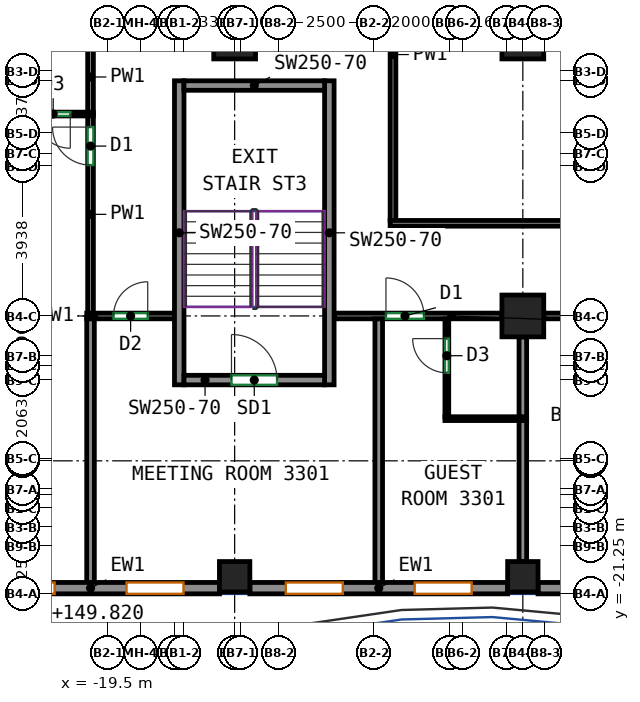
"""IFC4 building model, lengths in metres.
Left out: names, types, materials, properties, quantities, classifications, styles, units other than length and angle.
Written with IfcOpenShell. Run it as: python <this file> out.ifc"""

import sys

from ifc_helpers import new_model, si_unit, direction, frame, frame_2d, origin, origin_2d, place, context, subcontext, project, spatial, rectangle, extrude, source, transform, mapped, element, fill, save


model = new_model("IFC4")
c1 = context("Model", 3, precision=1e-05, world=origin(), true_north=direction((0.0, 1.0)))
c2 = subcontext(c1, "Body", "Model", "MODEL_VIEW")
j1 = project(units=[si_unit("LENGTHUNIT", "METRE"), si_unit("PLANEANGLEUNIT", "RADIAN")], contexts=[c1])
p1 = place(None, origin())
s1 = spatial("IfcSite", under=j1, at=p1, CompositionType="ELEMENT")
p2 = place(p1, origin())
s2 = spatial("IfcBuilding", under=s1, at=p2, CompositionType="ELEMENT")
p3 = place(p2, frame((0.0, 0.0, 147.3)))
s3 = spatial("IfcBuildingStorey", under=s2, at=p3, CompositionType="ELEMENT", Elevation=147.3)
m1 = source(origin(), c2, "Body", "SweptSolid", [
    extrude(rectangle(XDim=0.8, YDim=0.8, at=origin_2d()), origin(), (0.0, 0.0, 1.0), 3.12),
])
p4 = place(p3, frame((-16.167, -20.8, 0.0), z_axis=(0.0, 0.0, 1.0), x_axis=(1.0, 0.0, 0.0)))
e1 = element("IfcColumn", 1, at=p4, inside=s3, PredefinedType="COLUMN", context=c2, shape_type="MappedRepresentation", body=[
    mapped(m1, transform((0.0, 0.0, 0.0))),
])
m2 = source(origin(), c2, "Body", "SweptSolid", [
    extrude(rectangle(XDim=1.1, YDim=1.1, at=origin_2d()), origin(), (0.0, 0.0, 1.0), 3.12),
])
p5 = place(p3, frame((-16.167, -6.625, 0.0), z_axis=(0.0, 0.0, 1.0), x_axis=(1.0, 0.0, 0.0)))
e2 = element("IfcColumn", 2, at=p5, inside=s3, PredefinedType="COLUMN", context=c2, shape_type="MappedRepresentation", body=[
    mapped(m2, transform((0.0, 0.0, 0.0))),
])
p6 = place(p3, frame((-8.583, -20.8, 0.0), z_axis=(0.0, 0.0, 1.0), x_axis=(1.0, 0.0, 0.0)))
e3 = element("IfcColumn", 3, at=p6, inside=s3, PredefinedType="COLUMN", context=c2, shape_type="MappedRepresentation", body=[
    mapped(m1, transform((0.0, 0.0, 0.0))),
])
for number, where, z_axis, x_axis in (
    (4, (-8.583, -13.938, 0.0), (0.0, 0.0, 1.0), (1.0, 0.0, 0.0)),
    (5, (-8.583, -6.625, 0.0), (0.0, 0.0, 1.0), (1.0, 0.0, 0.0)),
):
    element("IfcColumn", number, at=place(p3, frame(where, z_axis=z_axis, x_axis=x_axis)), inside=s3, PredefinedType="COLUMN", context=c2, shape_type="MappedRepresentation", body=[
        mapped(m2, transform((0.0, 0.0, 0.0))),
    ])
m3 = source(origin(), c2, "Body", "SweptSolid", [
    extrude(rectangle(XDim=8.0, YDim=0.25, at=frame_2d((4.0, 0.0))), origin(), (0.0, 0.0, 1.0), 3.12),
])
for number, where, z_axis, x_axis in (
    (6, (-17.625, -15.75, 0.0), (0.0, 0.0, 1.0), (0.0, 1.0, 0.0)),
    (7, (-13.675, -15.75, 0.0), (0.0, 0.0, 1.0), (0.0, 1.0, 0.0)),
):
    element("IfcWall", number, at=place(p3, frame(where, z_axis=z_axis, x_axis=x_axis)), inside=s3, PredefinedType="SHEAR", context=c2, shape_type="MappedRepresentation", body=[
        mapped(m3, transform((0.0, 0.0, 0.0))),
    ])
m4 = source(origin(), c2, "Body", "SweptSolid", [
    extrude(rectangle(XDim=3.7, YDim=0.25, at=frame_2d((1.85, 0.0))), origin(), (0.0, 0.0, 1.0), 3.12),
])
p7 = place(p3, frame((-17.5, -15.625, 0.0), z_axis=(0.0, 0.0, 1.0), x_axis=(1.0, 0.0, 0.0)))
e8 = element("IfcWall", 8, at=p7, inside=s3, PredefinedType="SHEAR", context=c2, shape_type="MappedRepresentation", body=[
    mapped(m4, transform((0.0, 0.0, 0.0))),
])
p8 = place(p7, frame((1.25, 0.0, 0.0)))
e9 = element("IfcOpeningElement", 9, at=p8, cuts=e8, PredefinedType="OPENING", context=c2, shape_type="SweptSolid", body=[
    extrude(rectangle(XDim=1.2, YDim=2.1, at=frame_2d((0.6, 1.05))), frame((0.0, 0.135, 0.0), z_axis=(0.0, -1.0, 0.0), x_axis=(1.0, 0.0, 0.0)), (0.0, 0.0, 1.0), 0.27),
])
p9 = place(p3, frame((-17.5, -7.875, 0.0), z_axis=(0.0, 0.0, 1.0), x_axis=(1.0, 0.0, 0.0)))
e10 = element("IfcWall", 10, at=p9, inside=s3, PredefinedType="SHEAR", context=c2, shape_type="MappedRepresentation", body=[
    mapped(m4, transform((0.0, 0.0, 0.0))),
])
m5 = source(origin(), c2, "Body", "SweptSolid", [
    extrude(rectangle(XDim=6.783, YDim=0.3, at=frame_2d((3.392, 0.0))), origin(), (0.0, 0.0, 1.0), 3.12),
])
p10 = place(p3, frame((-23.35, -21.1, 0.0), z_axis=(0.0, 0.0, 1.0), x_axis=(1.0, 0.0, 0.0)))
e11 = element("IfcWall", 11, at=p10, inside=s3, PredefinedType="SOLIDWALL", context=c2, shape_type="MappedRepresentation", body=[
    mapped(m5, transform((0.0, 0.0, 0.0))),
])
p11 = place(p10, frame((0.946, 0.0, 0.85)))
e12 = element("IfcOpeningElement", 12, at=p11, cuts=e11, PredefinedType="OPENING", context=c2, shape_type="SweptSolid", body=[
    extrude(rectangle(XDim=1.5, YDim=1.95, at=frame_2d((0.75, 0.975))), frame((0.0, 0.16, 0.0), z_axis=(0.0, -1.0, 0.0), x_axis=(1.0, 0.0, 0.0)), (0.0, 0.0, 1.0), 0.32),
])
p12 = place(p10, frame((4.337, 0.0, 0.85)))
e13 = element("IfcOpeningElement", 13, at=p12, cuts=e11, PredefinedType="OPENING", context=c2, shape_type="SweptSolid", body=[
    extrude(rectangle(XDim=1.5, YDim=1.95, at=frame_2d((0.75, 0.975))), frame((0.0, 0.16, 0.0), z_axis=(0.0, -1.0, 0.0), x_axis=(1.0, 0.0, 0.0)), (0.0, 0.0, 1.0), 0.32),
])
m6 = source(origin(), c2, "Body", "SweptSolid", [
    extrude(rectangle(XDim=6.783, YDim=0.3, at=frame_2d((3.392, 0.0))), origin(), (0.0, 0.0, 1.0), 3.12),
])
p13 = place(p3, frame((-15.767, -21.1, 0.0), z_axis=(0.0, 0.0, 1.0), x_axis=(1.0, 0.0, 0.0)))
e14 = element("IfcWall", 14, at=p13, inside=s3, PredefinedType="SOLIDWALL", context=c2, shape_type="MappedRepresentation", body=[
    mapped(m6, transform((0.0, 0.0, 0.0))),
])
p14 = place(p13, frame((0.946, 0.0, 0.85)))
e15 = element("IfcOpeningElement", 15, at=p14, cuts=e14, PredefinedType="OPENING", context=c2, shape_type="SweptSolid", body=[
    extrude(rectangle(XDim=1.5, YDim=1.95, at=frame_2d((0.75, 0.975))), frame((0.0, 0.16, 0.0), z_axis=(0.0, -1.0, 0.0), x_axis=(1.0, 0.0, 0.0)), (0.0, 0.0, 1.0), 0.32),
])
p15 = place(p13, frame((4.338, 0.0, 0.85)))
e16 = element("IfcOpeningElement", 16, at=p15, cuts=e14, PredefinedType="OPENING", context=c2, shape_type="SweptSolid", body=[
    extrude(rectangle(XDim=1.5, YDim=1.95, at=frame_2d((0.75, 0.975))), frame((0.0, 0.16, 0.0), z_axis=(0.0, -1.0, 0.0), x_axis=(1.0, 0.0, 0.0)), (0.0, 0.0, 1.0), 0.32),
])
p16 = place(p3, frame((-8.183, -21.1, 0.0), z_axis=(0.0, 0.0, 1.0), x_axis=(1.0, 0.0, 0.0)))
e17 = element("IfcWall", 17, at=p16, inside=s3, PredefinedType="SOLIDWALL", context=c2, shape_type="MappedRepresentation", body=[
    mapped(m5, transform((0.0, 0.0, 0.0))),
])
p17 = place(p16, frame((0.946, 0.0, 0.85)))
e18 = element("IfcOpeningElement", 18, at=p17, cuts=e17, PredefinedType="OPENING", context=c2, shape_type="SweptSolid", body=[
    extrude(rectangle(XDim=1.5, YDim=1.95, at=frame_2d((0.75, 0.975))), frame((0.0, 0.16, 0.0), z_axis=(0.0, -1.0, 0.0), x_axis=(1.0, 0.0, 0.0)), (0.0, 0.0, 1.0), 0.32),
])
p18 = place(p16, frame((4.337, 0.0, 0.85)))
e19 = element("IfcOpeningElement", 19, at=p18, cuts=e17, PredefinedType="OPENING", context=c2, shape_type="SweptSolid", body=[
    extrude(rectangle(XDim=1.5, YDim=1.95, at=frame_2d((0.75, 0.975))), frame((0.0, 0.16, 0.0), z_axis=(0.0, -1.0, 0.0), x_axis=(1.0, 0.0, 0.0)), (0.0, 0.0, 1.0), 0.32),
])
p19 = place(p3, frame((-13.55, -13.938, 0.0), z_axis=(0.0, 0.0, 1.0), x_axis=(1.0, 0.0, 0.0)))
e20 = element("IfcWall", 20, at=p19, inside=s3, PredefinedType="PARTITIONING", context=c2, shape_type="SweptSolid", body=[
    extrude(rectangle(XDim=4.417, YDim=0.15, at=frame_2d((2.208, 0.0))), origin(), (0.0, 0.0, 1.0), 3.12),
])
p20 = place(p19, frame((1.365, 0.0, 0.0)))
e21 = element("IfcOpeningElement", 21, at=p20, cuts=e20, PredefinedType="OPENING", context=c2, shape_type="SweptSolid", body=[
    extrude(rectangle(XDim=1.0, YDim=2.1, at=frame_2d((0.5, 1.05))), frame((0.0, 0.085, 0.0), z_axis=(0.0, -1.0, 0.0), x_axis=(1.0, 0.0, 0.0)), (0.0, 0.0, 1.0), 0.17),
])
p21 = place(p3, frame((-20.059, -13.938, 0.0), z_axis=(0.0, 0.0, 1.0), x_axis=(1.0, 0.0, 0.0)))
e22 = element("IfcWall", 22, at=p21, inside=s3, PredefinedType="PARTITIONING", context=c2, shape_type="SweptSolid", body=[
    extrude(rectangle(XDim=2.309, YDim=0.15, at=frame_2d((1.155, 0.0))), origin(), (0.0, 0.0, 1.0), 3.12),
])
p22 = place(p21, frame((0.705, 0.0, 0.0)))
e23 = element("IfcOpeningElement", 23, at=p22, cuts=e22, PredefinedType="OPENING", context=c2, shape_type="SweptSolid", body=[
    extrude(rectangle(XDim=0.9, YDim=2.1, at=frame_2d((0.45, 1.05))), frame((0.0, 0.085, 0.0), z_axis=(0.0, -1.0, 0.0), x_axis=(1.0, 0.0, 0.0)), (0.0, 0.0, 1.0), 0.17),
])
p23 = place(p3, frame((-8.033, -13.938, 0.0), z_axis=(0.0, 0.0, 1.0), x_axis=(1.0, 0.0, 0.0)))
e24 = element("IfcWall", 24, at=p23, inside=s3, PredefinedType="PARTITIONING", context=c2, shape_type="SweptSolid", body=[
    extrude(rectangle(XDim=6.483, YDim=0.15, at=frame_2d((3.241, 0.0))), origin(), (0.0, 0.0, 1.0), 3.12),
])
p24 = place(p23, frame((0.508, 0.0, 0.0)))
e25 = element("IfcOpeningElement", 25, at=p24, cuts=e24, PredefinedType="OPENING", context=c2, shape_type="SweptSolid", body=[
    extrude(rectangle(XDim=0.9, YDim=2.1, at=frame_2d((0.45, 1.05))), frame((0.0, 0.085, 0.0), z_axis=(0.0, -1.0, 0.0), x_axis=(1.0, 0.0, 0.0)), (0.0, 0.0, 1.0), 0.17),
])
p25 = place(p23, frame((4.972, 0.0, 0.0)))
e26 = element("IfcOpeningElement", 26, at=p25, cuts=e24, PredefinedType="OPENING", context=c2, shape_type="SweptSolid", body=[
    extrude(rectangle(XDim=0.9, YDim=2.1, at=frame_2d((0.45, 1.05))), frame((0.0, 0.085, 0.0), z_axis=(0.0, -1.0, 0.0), x_axis=(1.0, 0.0, 0.0)), (0.0, 0.0, 1.0), 0.17),
])
p26 = place(p3, frame((-19.959, -13.863, 0.0), z_axis=(0.0, 0.0, 1.0), x_axis=(0.0, 1.0, 0.0)))
e27 = element("IfcWall", 27, at=p26, inside=s3, PredefinedType="PARTITIONING", context=c2, shape_type="SweptSolid", body=[
    extrude(rectangle(XDim=5.198, YDim=0.15, at=frame_2d((2.599, 0.0))), origin(), (0.0, 0.0, 1.0), 3.12),
])
p27 = place(p26, frame((3.895, 0.0, 0.0)))
e28 = element("IfcOpeningElement", 28, at=p27, cuts=e27, PredefinedType="OPENING", context=c2, shape_type="SweptSolid", body=[
    extrude(rectangle(XDim=1.0, YDim=2.1, at=frame_2d((0.5, 1.05))), frame((0.0, 0.085, 0.0), z_axis=(0.0, -1.0, 0.0), x_axis=(1.0, 0.0, 0.0)), (0.0, 0.0, 1.0), 0.17),
])
p28 = place(p3, frame((-19.959, -8.585, 0.0), z_axis=(0.0, 0.0, 1.0), x_axis=(0.0, 1.0, 0.0)))
e29 = element("IfcWall", 29, at=p28, inside=s3, PredefinedType="PARTITIONING", context=c2, shape_type="SweptSolid", body=[
    extrude(rectangle(XDim=1.87, YDim=0.15, at=frame_2d((0.935, 0.0))), origin(), (0.0, 0.0, 1.0), 3.12),
])
p29 = place(p3, frame((-12.0, -11.425, 0.0), z_axis=(0.0, 0.0, 1.0), x_axis=(0.0, 1.0, 0.0)))
e30 = element("IfcWall", 30, at=p29, inside=s3, PredefinedType="PARTITIONING", context=c2, shape_type="SweptSolid", body=[
    extrude(rectangle(XDim=14.55, YDim=0.15, at=frame_2d((7.275, 0.0))), origin(), (0.0, 0.0, 1.0), 3.12),
])
p30 = place(p29, frame((7.327, 0.0, 0.0)))
e31 = element("IfcOpeningElement", 31, at=p30, cuts=e30, PredefinedType="OPENING", context=c2, shape_type="SweptSolid", body=[
    extrude(rectangle(XDim=0.9, YDim=2.1, at=frame_2d((0.45, 1.05))), frame((0.0, 0.085, 0.0), z_axis=(0.0, -1.0, 0.0), x_axis=(1.0, 0.0, 0.0)), (0.0, 0.0, 1.0), 0.17),
])
p31 = place(p3, frame((-12.075, -11.5, 0.0), z_axis=(0.0, 0.0, 1.0), x_axis=(1.0, 0.0, 0.0)))
e32 = element("IfcWall", 32, at=p31, inside=s3, PredefinedType="PARTITIONING", context=c2, shape_type="SweptSolid", body=[
    extrude(rectangle(XDim=28.35, YDim=0.15, at=frame_2d((14.175, 0.0))), origin(), (0.0, 0.0, 1.0), 3.12),
])
p32 = place(p31, frame((13.677, 0.0, 0.0)))
e33 = element("IfcOpeningElement", 33, at=p32, cuts=e32, PredefinedType="OPENING", context=c2, shape_type="SweptSolid", body=[
    extrude(rectangle(XDim=0.9, YDim=2.1, at=frame_2d((0.45, 1.05))), frame((0.0, 0.085, 0.0), z_axis=(0.0, -1.0, 0.0), x_axis=(1.0, 0.0, 0.0)), (0.0, 0.0, 1.0), 0.17),
])
for number, where, z_axis, x_axis in (
    (34, (-12.375, -21.0, 0.0), (0.0, 0.0, 1.0), (0.0, 1.0, 0.0)),
    (35, (-19.959, -21.0, 0.0), (0.0, 0.0, 1.0), (0.0, 1.0, 0.0)),
):
    element("IfcWall", number, at=place(p3, frame(where, z_axis=z_axis, x_axis=x_axis)), inside=s3, PredefinedType="PARTITIONING", context=c2, shape_type="SweptSolid", body=[
        extrude(rectangle(XDim=6.985, YDim=0.2, at=frame_2d((3.493, 0.0))), origin(), (0.0, 0.0, 1.0), 3.12),
    ])
p33 = place(p3, frame((-10.583, -16.59, 0.0), z_axis=(0.0, 0.0, 1.0), x_axis=(0.0, 1.0, 0.0)))
e36 = element("IfcWall", 36, at=p33, inside=s3, PredefinedType="PARTITIONING", context=c2, shape_type="SweptSolid", body=[
    extrude(rectangle(XDim=2.575, YDim=0.1, at=frame_2d((1.288, 0.0))), origin(), (0.0, 0.0, 1.0), 3.12),
])
p34 = place(p33, frame((1.156, 0.0, 0.0)))
e37 = element("IfcOpeningElement", 37, at=p34, cuts=e36, PredefinedType="OPENING", context=c2, shape_type="SweptSolid", body=[
    extrude(rectangle(XDim=0.9, YDim=2.1, at=frame_2d((0.45, 1.05))), frame((0.0, 0.06, 0.0), z_axis=(0.0, -1.0, 0.0), x_axis=(1.0, 0.0, 0.0)), (0.0, 0.0, 1.0), 0.12),
])
p35 = place(p3, frame((-10.633, -16.64, 0.0), z_axis=(0.0, 0.0, 1.0), x_axis=(1.0, 0.0, 0.0)))
e38 = element("IfcWall", 38, at=p35, inside=s3, PredefinedType="PARTITIONING", context=c2, shape_type="SweptSolid", body=[
    extrude(rectangle(XDim=2.15, YDim=0.1, at=frame_2d((1.075, 0.0))), origin(), (0.0, 0.0, 1.0), 3.12),
])
p36 = place(p3, frame((-8.583, -20.4, 0.0), z_axis=(0.0, 0.0, 1.0), x_axis=(0.0, 1.0, 0.0)))
e39 = element("IfcWall", 39, at=p36, inside=s3, PredefinedType="PARTITIONING", context=c2, shape_type="SweptSolid", body=[
    extrude(rectangle(XDim=3.71, YDim=0.2, at=frame_2d((1.855, 0.0))), origin(), (0.0, 0.0, 1.0), 3.12),
])
p37 = place(p3, frame((-8.583, -16.59, 0.0), z_axis=(0.0, 0.0, 1.0), x_axis=(0.0, 1.0, 0.0)))
e40 = element("IfcWall", 40, at=p37, inside=s3, PredefinedType="PARTITIONING", context=c2, shape_type="SweptSolid", body=[
    extrude(rectangle(XDim=2.102, YDim=0.2, at=frame_2d((1.051, 0.0))), origin(), (0.0, 0.0, 1.0), 3.12),
])
p38 = place(p3, frame((-19.886, -8.625, 0.0), z_axis=(0.0, 0.0, 1.0), x_axis=(-1.0, 0.0, 0.0)))
e41 = element("IfcWall", 41, at=p38, inside=s3, PredefinedType="PARTITIONING", context=c2, shape_type="SweptSolid", body=[
    extrude(rectangle(XDim=2.823, YDim=0.1, at=frame_2d((1.412, 0.0))), origin(), (0.0, 0.0, 1.0), 3.12),
])
p39 = place(p38, frame((0.606, 0.0, 0.0)))
e42 = element("IfcOpeningElement", 42, at=p39, cuts=e41, PredefinedType="OPENING", context=c2, shape_type="SweptSolid", body=[
    extrude(rectangle(XDim=0.9, YDim=2.1, at=frame_2d((0.45, 1.05))), frame((0.0, 0.06, 0.0), z_axis=(0.0, -1.0, 0.0), x_axis=(1.0, 0.0, 0.0)), (0.0, 0.0, 1.0), 0.12),
])
p40 = place(p11, origin())
e43 = element("IfcWindow", 43, at=p40, inside=s3, PartitioningType="SINGLE_PANEL", PredefinedType="WINDOW", context=c2, shape_type="SweptSolid", body=[
    extrude(rectangle(XDim=1.5, YDim=1.95, at=frame_2d((0.75, 0.975))), frame((0.0, 0.03, 0.0), z_axis=(0.0, -1.0, 0.0), x_axis=(1.0, 0.0, 0.0)), (0.0, 0.0, 1.0), 0.06),
])
fill(e12, e43)
p41 = place(p12, origin())
e44 = element("IfcWindow", 44, at=p41, inside=s3, PartitioningType="SINGLE_PANEL", PredefinedType="WINDOW", context=c2, shape_type="SweptSolid", body=[
    extrude(rectangle(XDim=1.5, YDim=1.95, at=frame_2d((0.75, 0.975))), frame((0.0, 0.03, 0.0), z_axis=(0.0, -1.0, 0.0), x_axis=(1.0, 0.0, 0.0)), (0.0, 0.0, 1.0), 0.06),
])
fill(e13, e44)
p42 = place(p14, origin())
e45 = element("IfcWindow", 45, at=p42, inside=s3, PartitioningType="SINGLE_PANEL", PredefinedType="WINDOW", context=c2, shape_type="SweptSolid", body=[
    extrude(rectangle(XDim=1.5, YDim=1.95, at=frame_2d((0.75, 0.975))), frame((0.0, 0.03, 0.0), z_axis=(0.0, -1.0, 0.0), x_axis=(1.0, 0.0, 0.0)), (0.0, 0.0, 1.0), 0.06),
])
fill(e15, e45)
p43 = place(p15, origin())
e46 = element("IfcWindow", 46, at=p43, inside=s3, PartitioningType="SINGLE_PANEL", PredefinedType="WINDOW", context=c2, shape_type="SweptSolid", body=[
    extrude(rectangle(XDim=1.5, YDim=1.95, at=frame_2d((0.75, 0.975))), frame((0.0, 0.03, 0.0), z_axis=(0.0, -1.0, 0.0), x_axis=(1.0, 0.0, 0.0)), (0.0, 0.0, 1.0), 0.06),
])
fill(e16, e46)
p44 = place(p8, origin())
e47 = element("IfcDoor", 47, at=p44, inside=s3, OperationType="DOUBLE_DOOR_SINGLE_SWING", PredefinedType="DOOR", context=c2, shape_type="SweptSolid", body=[
    extrude(rectangle(XDim=1.2, YDim=2.1, at=frame_2d((0.6, 1.05))), frame((0.0, 0.025, 0.0), z_axis=(0.0, -1.0, 0.0), x_axis=(1.0, 0.0, 0.0)), (0.0, 0.0, 1.0), 0.05),
])
fill(e9, e47)
p45 = place(p34, origin())
e48 = element("IfcDoor", 48, at=p45, inside=s3, OperationType="SINGLE_SWING_RIGHT", PredefinedType="DOOR", context=c2, shape_type="SweptSolid", body=[
    extrude(rectangle(XDim=0.9, YDim=2.1, at=frame_2d((0.45, 1.05))), frame((0.0, 0.025, 0.0), z_axis=(0.0, -1.0, 0.0), x_axis=(1.0, 0.0, 0.0)), (0.0, 0.0, 1.0), 0.05),
])
fill(e37, e48)
p46 = place(p22, origin())
e49 = element("IfcDoor", 49, at=p46, inside=s3, OperationType="SINGLE_SWING_RIGHT", PredefinedType="DOOR", context=c2, shape_type="SweptSolid", body=[
    extrude(rectangle(XDim=0.9, YDim=2.1, at=frame_2d((0.45, 1.05))), frame((0.0, 0.025, 0.0), z_axis=(0.0, -1.0, 0.0), x_axis=(1.0, 0.0, 0.0)), (0.0, 0.0, 1.0), 0.05),
])
fill(e23, e49)
p47 = place(p20, origin())
e50 = element("IfcDoor", 50, at=p47, inside=s3, OperationType="SINGLE_SWING_LEFT", PredefinedType="DOOR", context=c2, shape_type="SweptSolid", body=[
    extrude(rectangle(XDim=1.0, YDim=2.1, at=frame_2d((0.5, 1.05))), frame((0.0, 0.025, 0.0), z_axis=(0.0, -1.0, 0.0), x_axis=(1.0, 0.0, 0.0)), (0.0, 0.0, 1.0), 0.05),
])
fill(e21, e50)
p48 = place(p27, origin())
e51 = element("IfcDoor", 51, at=p48, inside=s3, OperationType="SINGLE_SWING_RIGHT", PredefinedType="DOOR", context=c2, shape_type="SweptSolid", body=[
    extrude(rectangle(XDim=1.0, YDim=2.1, at=frame_2d((0.5, 1.05))), frame((0.0, 0.025, 0.0), z_axis=(0.0, -1.0, 0.0), x_axis=(1.0, 0.0, 0.0)), (0.0, 0.0, 1.0), 0.05),
])
fill(e28, e51)
p49 = place(p39, origin())
e52 = element("IfcDoor", 52, at=p49, inside=s3, OperationType="SINGLE_SWING_LEFT", PredefinedType="DOOR", context=c2, shape_type="SweptSolid", body=[
    extrude(rectangle(XDim=0.9, YDim=2.1, at=frame_2d((0.45, 1.05))), frame((0.0, 0.025, 0.0), z_axis=(0.0, -1.0, 0.0), x_axis=(1.0, 0.0, 0.0)), (0.0, 0.0, 1.0), 0.05),
])
fill(e42, e52)
save(model, sys.argv[1])
